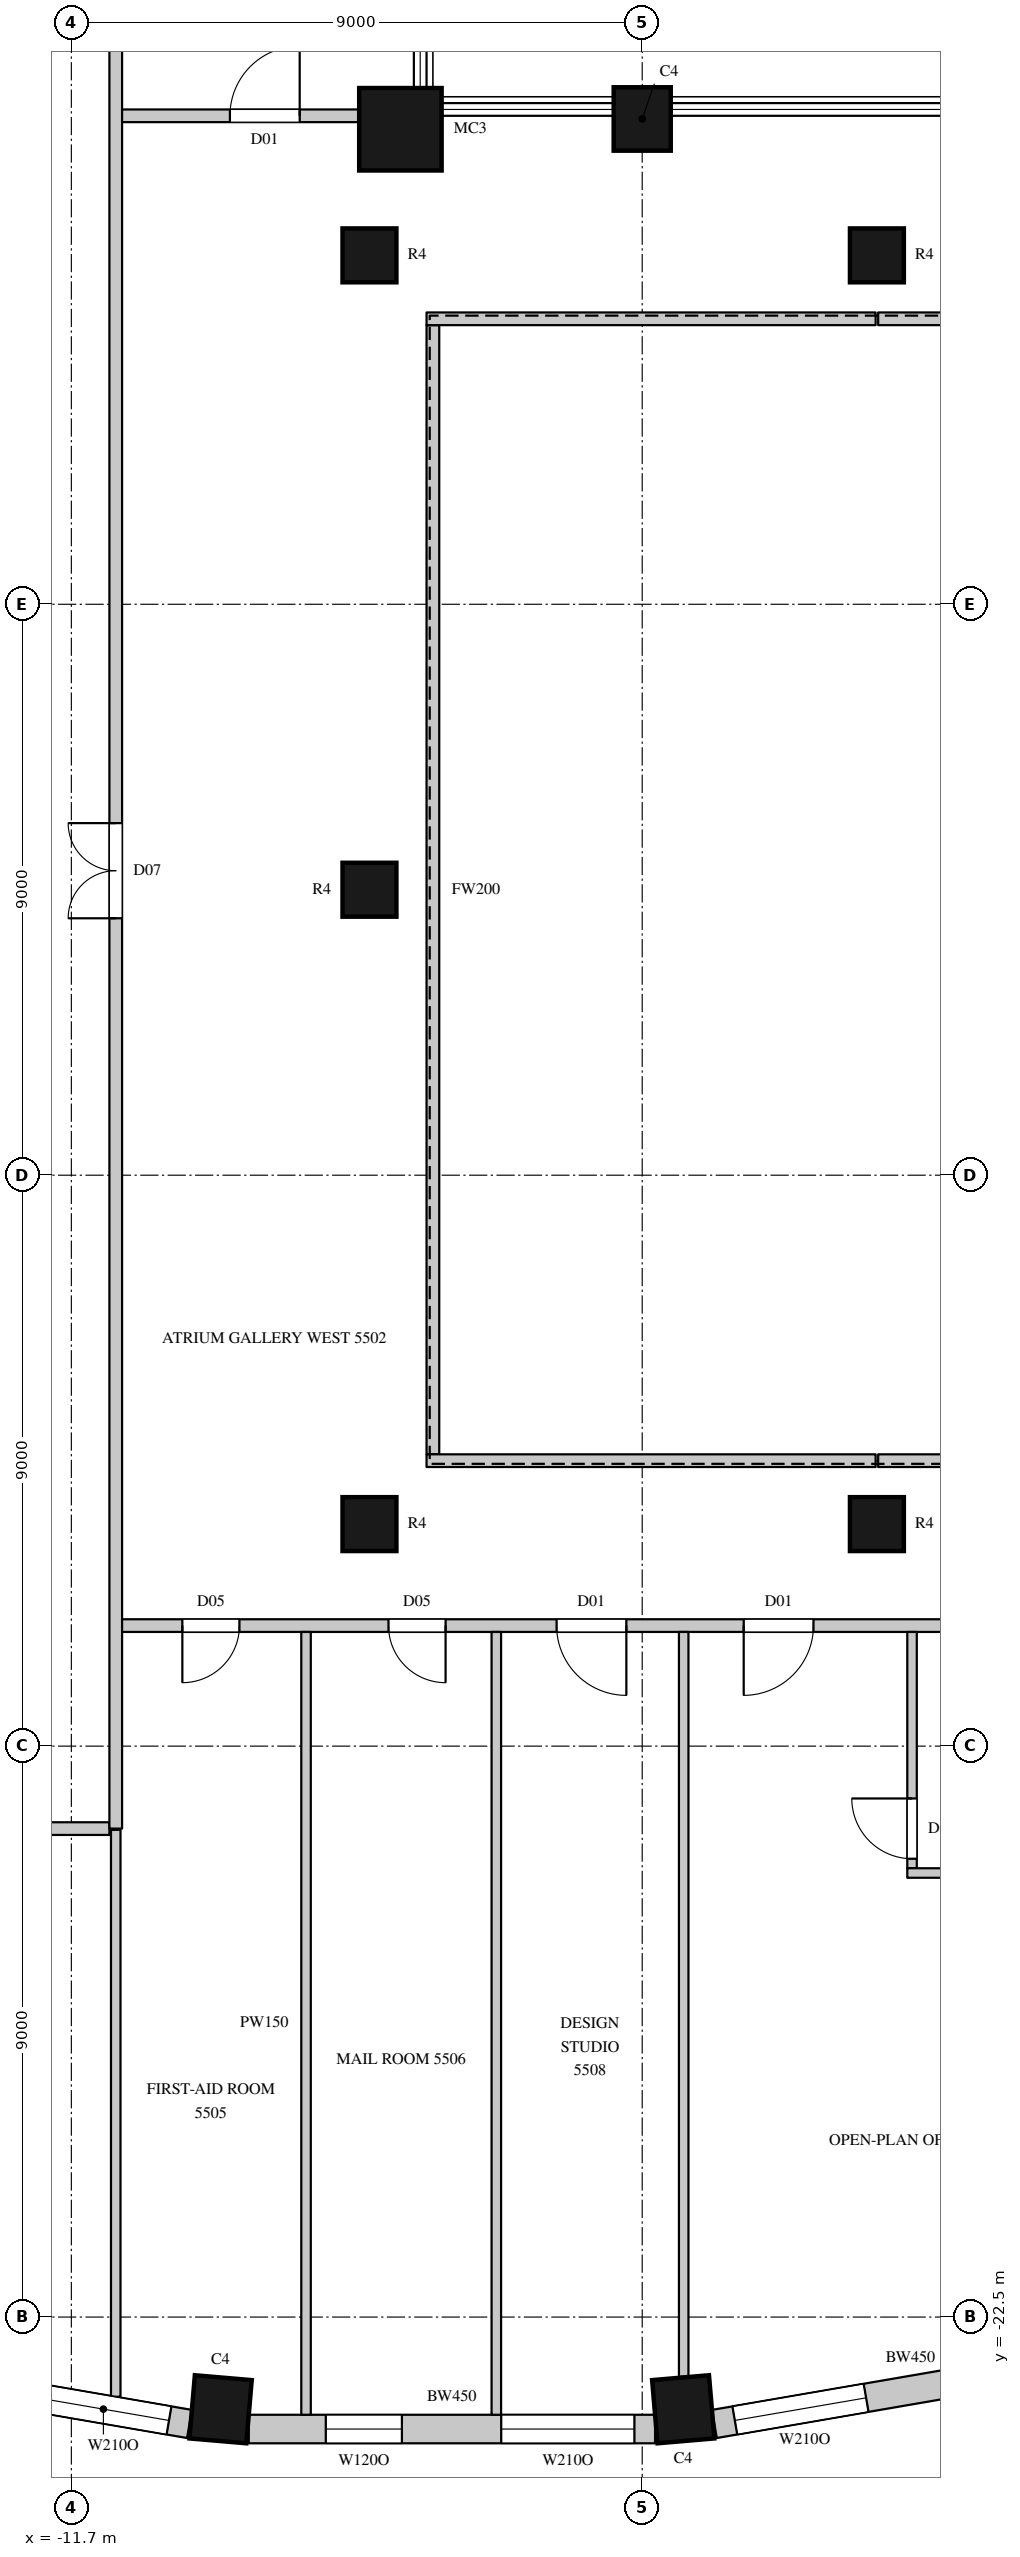
"""IFC4 building model, lengths in metres.
Left out: names, types, materials, properties, quantities, classifications, styles, units other than length and angle.
Written with IfcOpenShell. Run it as: python <this file> out.ifc"""

import sys

from ifc_helpers import new_model, si_unit, direction, frame, frame_2d, origin, origin_2d, place, context, subcontext, project, spatial, rectangle, circle, extrude, element, fill, save


model = new_model("IFC4")
c1 = context("Model", 3, precision=1e-05, world=origin(), true_north=direction((0.0, 1.0)))
c2 = subcontext(c1, "Body", "Model", "MODEL_VIEW")
j1 = project(units=[si_unit("LENGTHUNIT", "METRE"), si_unit("PLANEANGLEUNIT", "RADIAN")], contexts=[c1])
p1 = place(None, origin())
s1 = spatial("IfcSite", under=j1, at=p1, CompositionType="ELEMENT")
p2 = place(p1, origin())
s2 = spatial("IfcBuilding", under=s1, at=p2, CompositionType="ELEMENT")
p3 = place(p2, frame((0.0, 0.0, 247.5)))
s3 = spatial("IfcBuildingStorey", under=s2, at=p3, CompositionType="ELEMENT", Elevation=247.5)
p4 = place(p3, frame((-2.7, 12.15, 0.0), z_axis=(0.0, 0.0, 1.0), x_axis=(-1.0, 0.0, 0.0)))
e1 = element("IfcColumn", 1, at=p4, inside=s3, PredefinedType="COLUMN", context=c2, shape_type="SweptSolid", body=[
    extrude(rectangle(XDim=0.9, YDim=1.0, at=origin_2d()), origin(), (0.0, 0.0, 1.0), 4.1),
])
p5 = place(p3, frame((-6.512, 11.988, 0.0), z_axis=(0.0, 0.0, 1.0), x_axis=(1.0, 0.0, 0.0)))
e2 = element("IfcColumn", 2, at=p5, inside=s3, PredefinedType="COLUMN", context=c2, shape_type="SweptSolid", body=[
    extrude(circle(Radius=0.65, at=origin_2d()), origin(), (0.0, 0.0, 1.0), 4.1),
])
for number, where, z_axis, x_axis in (
    (3, (-9.347, -23.954, 0.0), (0.0, 0.0, 1.0), (0.996, -0.085, 0.0)),
    (4, (-2.053, -23.954, 0.0), (0.0, 0.0, 1.0), (0.996, 0.085, 0.0)),
):
    element("IfcColumn", number, at=place(p3, frame(where, z_axis=z_axis, x_axis=x_axis)), inside=s3, PredefinedType="COLUMN", context=c2, shape_type="SweptSolid", body=[
        extrude(rectangle(XDim=0.9, YDim=1.0, at=origin_2d()), origin(), (0.0, 0.0, 1.0), 4.1),
    ])
for number, where, z_axis, x_axis in (
    (5, (-7.0, -10.0, 0.0), (0.0, 0.0, 1.0), (1.0, 0.0, 0.0)),
    (6, (-7.0, 0.0, 0.0), (0.0, 0.0, 1.0), (1.0, 0.0, 0.0)),
    (7, (-7.0, 10.0, 0.0), (0.0, 0.0, 1.0), (1.0, 0.0, 0.0)),
    (8, (1.0, -10.0, 0.0), (0.0, 0.0, 1.0), (1.0, 0.0, 0.0)),
    (9, (1.0, 10.0, 0.0), (0.0, 0.0, 1.0), (1.0, 0.0, 0.0)),
):
    element("IfcColumn", number, at=place(p3, frame(where, z_axis=z_axis, x_axis=x_axis)), inside=s3, PredefinedType="COLUMN", context=c2, shape_type="SweptSolid", body=[
        extrude(circle(Radius=0.425, at=origin_2d()), origin(), (0.0, 0.0, 1.0), 4.1),
    ])
p6 = place(p3, frame((-16.157, -23.097, 0.0), z_axis=(0.0, 0.0, 1.0), x_axis=(0.985502073964, -0.169663379113, 0.0)))
e10 = element("IfcWall", 10, at=p6, inside=s3, PredefinedType="SOLIDWALL", context=c2, shape_type="SweptSolid", body=[
    extrude(rectangle(XDim=6.412, YDim=0.45, at=frame_2d((3.206, 0.0))), origin(), (0.0, 0.0, 1.0), 3.8),
])
p7 = place(p6, frame((0.327, 0.0, 1.05)))
e11 = element("IfcOpeningElement", 11, at=p7, cuts=e10, PredefinedType="OPENING", context=c2, shape_type="SweptSolid", body=[
    extrude(rectangle(XDim=2.1, YDim=2.4, at=frame_2d((1.05, 1.2))), frame((0.0, 0.235, 0.0), z_axis=(0.0, -1.0, 0.0), x_axis=(1.0, 0.0, 0.0)), (0.0, 0.0, 1.0), 0.47),
])
p8 = place(p6, frame((3.985, 0.0, 1.05)))
e12 = element("IfcOpeningElement", 12, at=p8, cuts=e10, PredefinedType="OPENING", context=c2, shape_type="SweptSolid", body=[
    extrude(rectangle(XDim=2.1, YDim=2.4, at=frame_2d((1.05, 1.2))), frame((0.0, 0.235, 0.0), z_axis=(0.0, -1.0, 0.0), x_axis=(1.0, 0.0, 0.0)), (0.0, 0.0, 1.0), 0.47),
])
p9 = place(p3, frame((-8.903, -24.265, 0.0), z_axis=(0.0, 0.0, 1.0), x_axis=(1.0, 0.0, 0.0)))
e13 = element("IfcWall", 13, at=p9, inside=s3, PredefinedType="SOLIDWALL", context=c2, shape_type="SweptSolid", body=[
    extrude(rectangle(XDim=6.406, YDim=0.45, at=frame_2d((3.203, 0.0))), origin(), (0.0, 0.0, 1.0), 3.8),
])
p10 = place(p9, frame((3.98, 0.0, 1.05)))
e14 = element("IfcOpeningElement", 14, at=p10, cuts=e13, PredefinedType="OPENING", context=c2, shape_type="SweptSolid", body=[
    extrude(rectangle(XDim=2.1, YDim=2.4, at=frame_2d((1.05, 1.2))), frame((0.0, 0.235, 0.0), z_axis=(0.0, -1.0, 0.0), x_axis=(1.0, 0.0, 0.0)), (0.0, 0.0, 1.0), 0.47),
])
p11 = place(p9, frame((1.214, 0.0, 1.05)))
e15 = element("IfcOpeningElement", 15, at=p11, cuts=e13, PredefinedType="OPENING", context=c2, shape_type="SweptSolid", body=[
    extrude(rectangle(XDim=1.2, YDim=2.4, at=frame_2d((0.6, 1.2))), frame((0.0, 0.235, 0.0), z_axis=(0.0, -1.0, 0.0), x_axis=(1.0, 0.0, 0.0)), (0.0, 0.0, 1.0), 0.47),
])
p12 = place(p3, frame((-1.562, -24.185, 0.0), z_axis=(0.0, 0.0, 1.0), x_axis=(0.985502073964, 0.169663379113, 0.0)))
e16 = element("IfcWall", 16, at=p12, inside=s3, PredefinedType="SOLIDWALL", context=c2, shape_type="SweptSolid", body=[
    extrude(rectangle(XDim=6.412, YDim=0.45, at=frame_2d((3.206, 0.0))), origin(), (0.0, 0.0, 1.0), 3.8),
])
p13 = place(p12, frame((0.327, 0.0, 1.05)))
e17 = element("IfcOpeningElement", 17, at=p13, cuts=e16, PredefinedType="OPENING", context=c2, shape_type="SweptSolid", body=[
    extrude(rectangle(XDim=2.1, YDim=2.4, at=frame_2d((1.05, 1.2))), frame((0.0, 0.235, 0.0), z_axis=(0.0, -1.0, 0.0), x_axis=(1.0, 0.0, 0.0)), (0.0, 0.0, 1.0), 0.47),
])
p14 = place(p12, frame((3.985, 0.0, 1.05)))
e18 = element("IfcOpeningElement", 18, at=p14, cuts=e16, PredefinedType="OPENING", context=c2, shape_type="SweptSolid", body=[
    extrude(rectangle(XDim=2.1, YDim=2.4, at=frame_2d((1.05, 1.2))), frame((0.0, 0.235, 0.0), z_axis=(0.0, -1.0, 0.0), x_axis=(1.0, 0.0, 0.0)), (0.0, 0.0, 1.0), 0.47),
])
p15 = place(p3, frame((-13.97, -14.8, 0.0), z_axis=(0.0, 0.0, 1.0), x_axis=(1.0, 0.0, 0.0)))
e19 = element("IfcWall", 19, at=p15, inside=s3, PredefinedType="PARTITIONING", context=c2, shape_type="SweptSolid", body=[
    extrude(rectangle(XDim=2.87, YDim=0.2, at=frame_2d((1.435, 0.0))), origin(), (0.0, 0.0, 1.0), 3.8),
])
p16 = place(p3, frame((-11.0, -14.8, 0.0), z_axis=(0.0, 0.0, 1.0), x_axis=(0.0, 1.0, 0.0)))
e20 = element("IfcWall", 20, at=p16, inside=s3, PredefinedType="PARTITIONING", context=c2, shape_type="SweptSolid", body=[
    extrude(rectangle(XDim=29.6, YDim=0.2, at=frame_2d((14.8, 0.0))), origin(), (0.0, 0.0, 1.0), 3.8),
])
p17 = place(p16, frame((14.35, 0.0, 0.0)))
e21 = element("IfcOpeningElement", 21, at=p17, cuts=e20, PredefinedType="OPENING", context=c2, shape_type="SweptSolid", body=[
    extrude(rectangle(XDim=1.5, YDim=2.4, at=frame_2d((0.75, 1.2))), frame((0.0, 0.11, 0.0), z_axis=(0.0, -1.0, 0.0), x_axis=(1.0, 0.0, 0.0)), (0.0, 0.0, 1.0), 0.22),
])
p18 = place(p3, frame((-10.9, -11.6, 0.0), z_axis=(0.0, 0.0, 1.0), x_axis=(1.0, 0.0, 0.0)))
e22 = element("IfcWall", 22, at=p18, inside=s3, PredefinedType="PARTITIONING", context=c2, shape_type="SweptSolid", body=[
    extrude(rectangle(XDim=21.4, YDim=0.2, at=frame_2d((10.7, 0.0))), origin(), (0.0, 0.0, 1.0), 3.8),
])
p19 = place(p18, frame((0.95, 0.0, 0.0)))
e23 = element("IfcOpeningElement", 23, at=p19, cuts=e22, PredefinedType="OPENING", context=c2, shape_type="SweptSolid", body=[
    extrude(rectangle(XDim=0.9, YDim=2.2, at=frame_2d((0.45, 1.1))), frame((0.0, 0.11, 0.0), z_axis=(0.0, -1.0, 0.0), x_axis=(1.0, 0.0, 0.0)), (0.0, 0.0, 1.0), 0.22),
])
p20 = place(p18, frame((4.2, 0.0, 0.0)))
e24 = element("IfcOpeningElement", 24, at=p20, cuts=e22, PredefinedType="OPENING", context=c2, shape_type="SweptSolid", body=[
    extrude(rectangle(XDim=0.9, YDim=2.2, at=frame_2d((0.45, 1.1))), frame((0.0, 0.11, 0.0), z_axis=(0.0, -1.0, 0.0), x_axis=(1.0, 0.0, 0.0)), (0.0, 0.0, 1.0), 0.22),
])
p21 = place(p18, frame((6.85, 0.0, 0.0)))
e25 = element("IfcOpeningElement", 25, at=p21, cuts=e22, PredefinedType="OPENING", context=c2, shape_type="SweptSolid", body=[
    extrude(rectangle(XDim=1.1, YDim=2.4, at=frame_2d((0.55, 1.2))), frame((0.0, 0.11, 0.0), z_axis=(0.0, -1.0, 0.0), x_axis=(1.0, 0.0, 0.0)), (0.0, 0.0, 1.0), 0.22),
])
p22 = place(p18, frame((9.8, 0.0, 0.0)))
e26 = element("IfcOpeningElement", 26, at=p22, cuts=e22, PredefinedType="OPENING", context=c2, shape_type="SweptSolid", body=[
    extrude(rectangle(XDim=1.1, YDim=2.4, at=frame_2d((0.55, 1.2))), frame((0.0, 0.11, 0.0), z_axis=(0.0, -1.0, 0.0), x_axis=(1.0, 0.0, 0.0)), (0.0, 0.0, 1.0), 0.22),
])
p23 = place(p3, frame((-10.9, 12.2, 0.0), z_axis=(0.0, 0.0, 1.0), x_axis=(1.0, 0.0, 0.0)))
e27 = element("IfcWall", 27, at=p23, inside=s3, PredefinedType="PARTITIONING", context=c2, shape_type="SweptSolid", body=[
    extrude(rectangle(XDim=3.756, YDim=0.2, at=frame_2d((1.878, 0.0))), origin(), (0.0, 0.0, 1.0), 3.8),
])
p24 = place(p23, frame((1.7, 0.0, 0.0)))
e28 = element("IfcOpeningElement", 28, at=p24, cuts=e27, PredefinedType="OPENING", context=c2, shape_type="SweptSolid", body=[
    extrude(rectangle(XDim=1.1, YDim=2.4, at=frame_2d((0.55, 1.2))), frame((0.0, 0.11, 0.0), z_axis=(0.0, -1.0, 0.0), x_axis=(1.0, 0.0, 0.0)), (0.0, 0.0, 1.0), 0.22),
])
p25 = place(p3, frame((-6.0, -8.9, 0.0), z_axis=(0.0, 0.0, 1.0), x_axis=(0.0, 1.0, 0.0)))
e29 = element("IfcWall", 29, at=p25, inside=s3, PredefinedType="PARTITIONING", context=c2, shape_type="SweptSolid", body=[
    extrude(rectangle(XDim=17.8, YDim=0.2, at=frame_2d((8.9, 0.0))), origin(), (0.0, 0.0, 1.0), 3.8),
])
for number, where, z_axis, x_axis in (
    (30, (-6.1, -9.0, 0.0), (0.0, 0.0, 1.0), (1.0, 0.0, 0.0)),
    (31, (-6.1, 9.0, 0.0), (0.0, 0.0, 1.0), (1.0, 0.0, 0.0)),
    (32, (1.02, -9.0, 0.0), (0.0, 0.0, 1.0), (1.0, 0.0, 0.0)),
    (33, (1.02, 9.0, 0.0), (0.0, 0.0, 1.0), (1.0, 0.0, 0.0)),
):
    element("IfcWall", number, at=place(p3, frame(where, z_axis=z_axis, x_axis=x_axis)), inside=s3, PredefinedType="PARTITIONING", context=c2, shape_type="SweptSolid", body=[
        extrude(rectangle(XDim=7.08, YDim=0.2, at=frame_2d((3.54, 0.0))), origin(), (0.0, 0.0, 1.0), 3.8),
    ])
p26 = place(p3, frame((-11.0, -23.757, 0.0), z_axis=(0.0, 0.0, 1.0), x_axis=(0.0, 1.0, 0.0)))
e34 = element("IfcWall", 34, at=p26, inside=s3, PredefinedType="PARTITIONING", context=c2, shape_type="SweptSolid", body=[
    extrude(rectangle(XDim=8.937, YDim=0.15, at=frame_2d((4.468, 0.0))), origin(), (0.0, 0.0, 1.0), 3.8),
])
for number, where, z_axis, x_axis in (
    (35, (-8.0, -24.04, 0.0), (0.0, 0.0, 1.0), (0.0, 1.0, 0.0)),
    (36, (-5.0, -24.04, 0.0), (0.0, 0.0, 1.0), (0.0, 1.0, 0.0)),
):
    element("IfcWall", number, at=place(p3, frame(where, z_axis=z_axis, x_axis=x_axis)), inside=s3, PredefinedType="PARTITIONING", context=c2, shape_type="SweptSolid", body=[
        extrude(rectangle(XDim=12.34, YDim=0.15, at=frame_2d((6.17, 0.0))), origin(), (0.0, 0.0, 1.0), 3.8),
    ])
p27 = place(p3, frame((-2.046, -23.441, 0.0), z_axis=(0.0, 0.0, 1.0), x_axis=(0.0, 1.0, 0.0)))
e37 = element("IfcWall", 37, at=p27, inside=s3, PredefinedType="PARTITIONING", context=c2, shape_type="SweptSolid", body=[
    extrude(rectangle(XDim=11.741, YDim=0.15, at=frame_2d((5.871, 0.0))), origin(), (0.0, 0.0, 1.0), 3.8),
])
p28 = place(p3, frame((1.554, -15.425, 0.0), z_axis=(0.0, 0.0, 1.0), x_axis=(0.0, 1.0, 0.0)))
e38 = element("IfcWall", 38, at=p28, inside=s3, PredefinedType="PARTITIONING", context=c2, shape_type="SweptSolid", body=[
    extrude(rectangle(XDim=3.725, YDim=0.15, at=frame_2d((1.863, 0.0))), origin(), (0.0, 0.0, 1.0), 3.8),
])
p29 = place(p28, frame((0.15, 0.0, 0.0)))
e39 = element("IfcOpeningElement", 39, at=p29, cuts=e38, PredefinedType="OPENING", context=c2, shape_type="SweptSolid", body=[
    extrude(rectangle(XDim=0.95, YDim=2.2, at=frame_2d((0.475, 1.1))), frame((0.0, 0.085, 0.0), z_axis=(0.0, -1.0, 0.0), x_axis=(1.0, 0.0, 0.0)), (0.0, 0.0, 1.0), 0.17),
])
p30 = place(p3, frame((1.479, -15.5, 0.0), z_axis=(0.0, 0.0, 1.0), x_axis=(1.0, 0.0, 0.0)))
e40 = element("IfcWall", 40, at=p30, inside=s3, PredefinedType="PARTITIONING", context=c2, shape_type="SweptSolid", body=[
    extrude(rectangle(XDim=7.35, YDim=0.15, at=frame_2d((3.675, 0.0))), origin(), (0.0, 0.0, 1.0), 3.8),
])
p31 = place(p30, frame((6.1, 0.0, 0.0)))
e41 = element("IfcOpeningElement", 41, at=p31, cuts=e40, PredefinedType="OPENING", context=c2, shape_type="SweptSolid", body=[
    extrude(rectangle(XDim=0.95, YDim=2.2, at=frame_2d((0.475, 1.1))), frame((0.0, 0.085, 0.0), z_axis=(0.0, -1.0, 0.0), x_axis=(1.0, 0.0, 0.0)), (0.0, 0.0, 1.0), 0.17),
])
p32 = place(p8, origin())
e42 = element("IfcWindow", 42, at=p32, inside=s3, PartitioningType="SINGLE_PANEL", PredefinedType="WINDOW", context=c2, shape_type="SweptSolid", body=[
    extrude(rectangle(XDim=2.1, YDim=2.4, at=frame_2d((1.05, 1.2))), frame((0.0, 0.135, 0.0), z_axis=(0.0, -1.0, 0.0), x_axis=(1.0, 0.0, 0.0)), (0.0, 0.0, 1.0), 0.06),
])
fill(e12, e42)
p33 = place(p10, origin())
e43 = element("IfcWindow", 43, at=p33, inside=s3, PartitioningType="SINGLE_PANEL", PredefinedType="WINDOW", context=c2, shape_type="SweptSolid", body=[
    extrude(rectangle(XDim=2.1, YDim=2.4, at=frame_2d((1.05, 1.2))), frame((0.0, 0.135, 0.0), z_axis=(0.0, -1.0, 0.0), x_axis=(1.0, 0.0, 0.0)), (0.0, 0.0, 1.0), 0.06),
])
fill(e14, e43)
p34 = place(p13, origin())
e44 = element("IfcWindow", 44, at=p34, inside=s3, PartitioningType="SINGLE_PANEL", PredefinedType="WINDOW", context=c2, shape_type="SweptSolid", body=[
    extrude(rectangle(XDim=2.1, YDim=2.4, at=frame_2d((1.05, 1.2))), frame((0.0, 0.135, 0.0), z_axis=(0.0, -1.0, 0.0), x_axis=(1.0, 0.0, 0.0)), (0.0, 0.0, 1.0), 0.06),
])
fill(e17, e44)
p35 = place(p17, origin())
e45 = element("IfcDoor", 45, at=p35, inside=s3, OperationType="DOUBLE_DOOR_SINGLE_SWING", PredefinedType="DOOR", context=c2, shape_type="SweptSolid", body=[
    extrude(rectangle(XDim=1.5, YDim=2.4, at=frame_2d((0.75, 1.2))), frame((0.0, 0.025, 0.0), z_axis=(0.0, -1.0, 0.0), x_axis=(1.0, 0.0, 0.0)), (0.0, 0.0, 1.0), 0.05),
])
fill(e21, e45)
p36 = place(p19, origin())
e46 = element("IfcDoor", 46, at=p36, inside=s3, OperationType="SINGLE_SWING_RIGHT", PredefinedType="DOOR", context=c2, shape_type="SweptSolid", body=[
    extrude(rectangle(XDim=0.9, YDim=2.2, at=frame_2d((0.45, 1.1))), frame((0.0, 0.025, 0.0), z_axis=(0.0, -1.0, 0.0), x_axis=(1.0, 0.0, 0.0)), (0.0, 0.0, 1.0), 0.05),
])
fill(e23, e46)
p37 = place(p20, origin())
e47 = element("IfcDoor", 47, at=p37, inside=s3, OperationType="SINGLE_SWING_LEFT", PredefinedType="DOOR", context=c2, shape_type="SweptSolid", body=[
    extrude(rectangle(XDim=0.9, YDim=2.2, at=frame_2d((0.45, 1.1))), frame((0.0, 0.025, 0.0), z_axis=(0.0, -1.0, 0.0), x_axis=(1.0, 0.0, 0.0)), (0.0, 0.0, 1.0), 0.05),
])
fill(e24, e47)
p38 = place(p24, origin())
e48 = element("IfcDoor", 48, at=p38, inside=s3, OperationType="SINGLE_SWING_RIGHT", PredefinedType="DOOR", context=c2, shape_type="SweptSolid", body=[
    extrude(rectangle(XDim=1.1, YDim=2.4, at=frame_2d((0.55, 1.2))), frame((0.0, 0.025, 0.0), z_axis=(0.0, -1.0, 0.0), x_axis=(1.0, 0.0, 0.0)), (0.0, 0.0, 1.0), 0.05),
])
fill(e28, e48)
p39 = place(p21, origin())
e49 = element("IfcDoor", 49, at=p39, inside=s3, OperationType="SINGLE_SWING_LEFT", PredefinedType="DOOR", context=c2, shape_type="SweptSolid", body=[
    extrude(rectangle(XDim=1.1, YDim=2.4, at=frame_2d((0.55, 1.2))), frame((0.0, 0.025, 0.0), z_axis=(0.0, -1.0, 0.0), x_axis=(1.0, 0.0, 0.0)), (0.0, 0.0, 1.0), 0.05),
])
fill(e25, e49)
p40 = place(p22, origin())
e50 = element("IfcDoor", 50, at=p40, inside=s3, OperationType="SINGLE_SWING_RIGHT", PredefinedType="DOOR", context=c2, shape_type="SweptSolid", body=[
    extrude(rectangle(XDim=1.1, YDim=2.4, at=frame_2d((0.55, 1.2))), frame((0.0, 0.025, 0.0), z_axis=(0.0, -1.0, 0.0), x_axis=(1.0, 0.0, 0.0)), (0.0, 0.0, 1.0), 0.05),
])
fill(e26, e50)
p41 = place(p29, origin())
e51 = element("IfcDoor", 51, at=p41, inside=s3, OperationType="SINGLE_SWING_RIGHT", PredefinedType="DOOR", context=c2, shape_type="SweptSolid", body=[
    extrude(rectangle(XDim=0.95, YDim=2.2, at=frame_2d((0.475, 1.1))), frame((0.0, 0.025, 0.0), z_axis=(0.0, -1.0, 0.0), x_axis=(1.0, 0.0, 0.0)), (0.0, 0.0, 1.0), 0.05),
])
fill(e39, e51)
p42 = place(p11, origin())
e52 = element("IfcWindow", 52, at=p42, inside=s3, PartitioningType="SINGLE_PANEL", PredefinedType="WINDOW", context=c2, shape_type="SweptSolid", body=[
    extrude(rectangle(XDim=1.2, YDim=2.4, at=frame_2d((0.6, 1.2))), frame((0.0, 0.135, 0.0), z_axis=(0.0, -1.0, 0.0), x_axis=(1.0, 0.0, 0.0)), (0.0, 0.0, 1.0), 0.06),
])
fill(e15, e52)
save(model, sys.argv[1])
